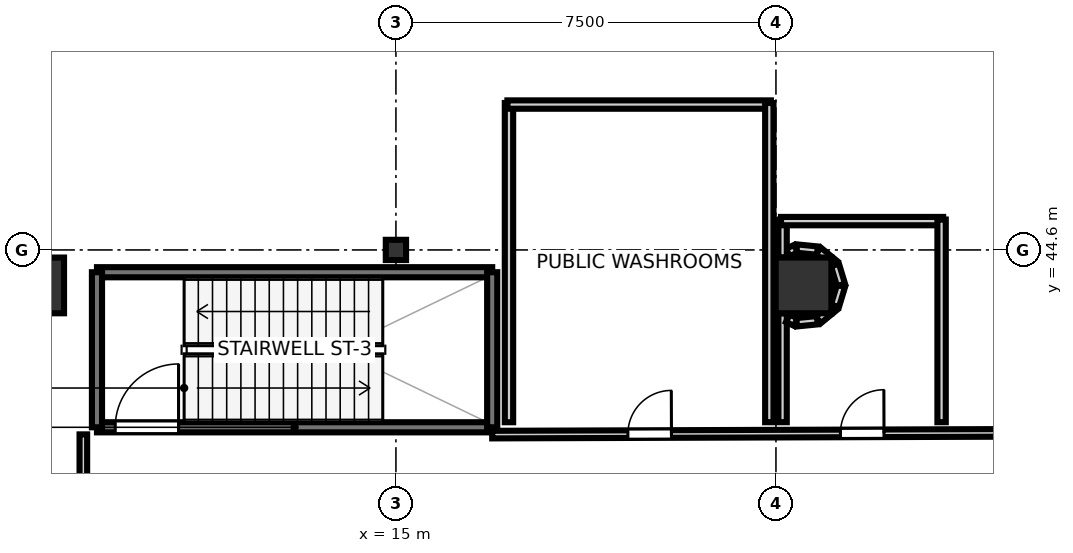
"""IFC4 building model, lengths in metres.
Left out: names, types, materials, properties, quantities, classifications, styles, units other than length and angle.
Written with IfcOpenShell. Run it as: python <this file> out.ifc"""

import sys

from ifc_helpers import new_model, si_unit, direction, frame, frame_2d, origin, origin_2d, place, context, subcontext, project, spatial, rectangle, i_section, extrude, element, fill, save


model = new_model("IFC4")
c1 = context("Model", 3, precision=1e-05, world=origin(), true_north=direction((0.0, 1.0)))
c2 = subcontext(c1, "Body", "Model", "MODEL_VIEW")
j1 = project(units=[si_unit("LENGTHUNIT", "METRE"), si_unit("PLANEANGLEUNIT", "RADIAN")], contexts=[c1])
p1 = place(None, origin())
s1 = spatial("IfcSite", under=j1, at=p1, CompositionType="ELEMENT")
p2 = place(p1, origin())
s2 = spatial("IfcBuilding", under=s1, at=p2, CompositionType="ELEMENT")
p3 = place(p2, frame((0.0, 0.0, 6.0)))
s3 = spatial("IfcBuildingStorey", under=s2, at=p3, CompositionType="ELEMENT", Elevation=6.0)
for number, where, z_axis, x_axis in (
    (1, (7.9, 43.9, 0.0), (0.0, 0.0, 1.0), (1.0, 0.0, 0.0)),
    (2, (23.045, 43.9, 0.0), (0.0, 0.0, 1.0), (1.0, 0.0, 0.0)),
):
    element("IfcColumn", number, at=place(p3, frame(where, z_axis=z_axis, x_axis=x_axis)), inside=s3, PredefinedType="COLUMN", context=c2, shape_type="SweptSolid", body=[
        extrude(rectangle(XDim=1.1, YDim=1.1, at=origin_2d()), origin(), (0.0, 0.0, 1.0), 5.0),
    ])
p4 = place(p3, frame((15.0, 44.6, 0.0), z_axis=(0.0, 0.0, 1.0), x_axis=(1.0, 0.0, 0.0)))
e3 = element("IfcColumn", 3, at=p4, inside=s3, PredefinedType="COLUMN", context=c2, shape_type="SweptSolid", body=[
    extrude(i_section(OverallWidth=0.4, OverallDepth=0.4, WebThickness=0.013, FlangeThickness=0.021, at=origin_2d()), origin(), (0.0, 0.0, 1.0), 5.0),
])
p5 = place(p3, frame((9.1, 41.1, 0.0), z_axis=(0.0, 0.0, 1.0), x_axis=(1.0, 0.0, 0.0)))
e4 = element("IfcWall", 4, at=p5, inside=s3, PredefinedType="SOLIDWALL", context=c2, shape_type="SweptSolid", body=[
    extrude(rectangle(XDim=7.8, YDim=0.2, at=frame_2d((3.9, 0.0))), origin(), (0.0, 0.0, 1.0), 4.78),
])
p6 = place(p5, frame((0.36, 0.0, 0.0)))
e5 = element("IfcOpeningElement", 5, at=p6, cuts=e4, PredefinedType="OPENING", context=c2, shape_type="SweptSolid", body=[
    extrude(rectangle(XDim=1.25, YDim=2.15, at=frame_2d((0.625, 1.075))), frame((0.0, 0.11, 0.0), z_axis=(0.0, -1.0, 0.0), x_axis=(1.0, 0.0, 0.0)), (0.0, 0.0, 1.0), 0.22),
])
p7 = place(p3, frame((9.1, 44.16, 0.0), z_axis=(0.0, 0.0, 1.0), x_axis=(1.0, 0.0, 0.0)))
e6 = element("IfcWall", 6, at=p7, inside=s3, PredefinedType="SOLIDWALL", context=c2, shape_type="SweptSolid", body=[
    extrude(rectangle(XDim=7.8, YDim=0.2, at=frame_2d((3.9, 0.0))), origin(), (0.0, 0.0, 1.0), 4.78),
])
for number, where, z_axis, x_axis in (
    (7, (9.1, 41.1, 0.0), (0.0, 0.0, 1.0), (0.0, 1.0, 0.0)),
    (8, (16.9, 41.1, 0.0), (0.0, 0.0, 1.0), (0.0, 1.0, 0.0)),
):
    element("IfcWall", number, at=place(p3, frame(where, z_axis=z_axis, x_axis=x_axis)), inside=s3, PredefinedType="SOLIDWALL", context=c2, shape_type="SweptSolid", body=[
        extrude(rectangle(XDim=3.06, YDim=0.2, at=frame_2d((1.53, 0.0))), origin(), (0.0, 0.0, 1.0), 4.78),
    ])
p8 = place(p3, frame((8.831, 37.8, 0.0), z_axis=(0.0, 0.0, 1.0), x_axis=(0.0, 1.0, 0.0)))
e9 = element("IfcWall", 9, at=p8, inside=s3, PredefinedType="PARTITIONING", context=c2, shape_type="SweptSolid", body=[
    extrude(rectangle(XDim=3.16, YDim=0.15, at=frame_2d((1.58, 0.0))), origin(), (0.0, 0.0, 1.0), 4.1),
])
p9 = place(p3, frame((16.9, 40.956, 0.0), z_axis=(0.0, 0.0, 1.0), x_axis=(0.999994432489, 0.003336913407, 0.0)))
e10 = element("IfcWall", 10, at=p9, inside=s3, PredefinedType="PARTITIONING", context=c2, shape_type="SweptSolid", body=[
    extrude(rectangle(XDim=9.95, YDim=0.15, at=frame_2d((4.975, 0.0))), origin(), (0.0, 0.0, 1.0), 4.1),
])
p10 = place(p9, frame((6.873, 0.0, 0.0)))
e11 = element("IfcOpeningElement", 11, at=p10, cuts=e10, PredefinedType="OPENING", context=c2, shape_type="SweptSolid", body=[
    extrude(rectangle(XDim=0.86, YDim=2.05, at=frame_2d((0.43, 1.025))), frame((0.0, 0.085, 0.0), z_axis=(0.0, -1.0, 0.0), x_axis=(1.0, 0.0, 0.0)), (0.0, 0.0, 1.0), 0.17),
])
p11 = place(p9, frame((2.678, 0.0, 0.0)))
e12 = element("IfcOpeningElement", 12, at=p11, cuts=e10, PredefinedType="OPENING", context=c2, shape_type="SweptSolid", body=[
    extrude(rectangle(XDim=0.86, YDim=2.05, at=frame_2d((0.43, 1.025))), frame((0.0, 0.085, 0.0), z_axis=(0.0, -1.0, 0.0), x_axis=(1.0, 0.0, 0.0)), (0.0, 0.0, 1.0), 0.17),
])
p12 = place(p3, frame((22.631, 41.2, 0.0), z_axis=(0.0, 0.0, 1.0), x_axis=(0.0, 1.0, 0.0)))
e13 = element("IfcWall", 13, at=p12, inside=s3, PredefinedType="PLUMBINGWALL", context=c2, shape_type="SweptSolid", body=[
    extrude(rectangle(XDim=2.151, YDim=0.165, at=frame_2d((1.075, 0.0))), origin(), (0.0, 0.0, 1.0), 4.1),
])
p13 = place(p3, frame((22.734, 43.252, 0.0), z_axis=(0.0, 0.0, 1.0), x_axis=(0.901001669759, -0.433815618773, 0.0)))
e14 = element("IfcWall", 14, at=p13, inside=s3, PredefinedType="PLUMBINGWALL", context=c2, shape_type="SweptSolid", body=[
    extrude(rectangle(XDim=0.176, YDim=0.165, at=frame_2d((0.088, 0.0))), origin(), (0.0, 0.0, 1.0), 4.1),
])
for number, where, z_axis, x_axis in (
    (15, (22.909, 43.173, 0.0), (0.0, 0.0, 1.0), (0.995, 0.098, 0.0)),
    (16, (23.336, 43.22, 0.0), (0.0, 0.0, 1.0), (0.773, 0.634, 0.0)),
):
    element("IfcWall", number, at=place(p3, frame(where, z_axis=z_axis, x_axis=x_axis)), inside=s3, PredefinedType="PLUMBINGWALL", context=c2, shape_type="SweptSolid", body=[
        extrude(rectangle(XDim=0.412, YDim=0.165, at=frame_2d((0.206, 0.0))), origin(), (0.0, 0.0, 1.0), 4.1),
    ])
for number, where, z_axis, x_axis in (
    (17, (23.665, 43.497, 0.0), (0.0, 0.0, 1.0), (0.29, 0.957, 0.0)),
    (18, (23.784, 43.909, 0.0), (0.0, 0.0, 1.0), (-0.29, 0.957, 0.0)),
):
    element("IfcWall", number, at=place(p3, frame(where, z_axis=z_axis, x_axis=x_axis)), inside=s3, PredefinedType="PLUMBINGWALL", context=c2, shape_type="SweptSolid", body=[
        extrude(rectangle(XDim=0.412, YDim=0.165, at=frame_2d((0.206, 0.0))), origin(), (0.0, 0.0, 1.0), 4.1),
    ])
for number, where, z_axis, x_axis in (
    (19, (23.655, 44.318, 0.0), (0.0, 0.0, 1.0), (-0.773, 0.634, 0.0)),
    (20, (23.319, 44.587, 0.0), (0.0, 0.0, 1.0), (-0.995, 0.098, 0.0)),
):
    element("IfcWall", number, at=place(p3, frame(where, z_axis=z_axis, x_axis=x_axis)), inside=s3, PredefinedType="PLUMBINGWALL", context=c2, shape_type="SweptSolid", body=[
        extrude(rectangle(XDim=0.412, YDim=0.165, at=frame_2d((0.206, 0.0))), origin(), (0.0, 0.0, 1.0), 4.1),
    ])
p14 = place(p3, frame((22.893, 44.624, 0.0), z_axis=(0.0, 0.0, 1.0), x_axis=(-0.901001669759, -0.433815618773, 0.0)))
e21 = element("IfcWall", 21, at=p14, inside=s3, PredefinedType="PLUMBINGWALL", context=c2, shape_type="SweptSolid", body=[
    extrude(rectangle(XDim=0.176, YDim=0.165, at=frame_2d((0.088, 0.0))), origin(), (0.0, 0.0, 1.0), 4.1),
])
p15 = place(p3, frame((22.631, 44.449, 0.0), z_axis=(0.0, 0.0, 1.0), x_axis=(0.0, 1.0, 0.0)))
e22 = element("IfcWall", 22, at=p15, inside=s3, PredefinedType="PLUMBINGWALL", context=c2, shape_type="SweptSolid", body=[
    extrude(rectangle(XDim=0.751, YDim=0.165, at=frame_2d((0.375, 0.0))), origin(), (0.0, 0.0, 1.0), 4.1),
])
p16 = place(p3, frame((22.6, 45.169, 0.0), z_axis=(0.0, 0.0, 1.0), x_axis=(1.0, 0.0, 0.0)))
e23 = element("IfcWall", 23, at=p16, inside=s3, PredefinedType="PLUMBINGWALL", context=c2, shape_type="SweptSolid", body=[
    extrude(rectangle(XDim=3.2, YDim=0.165, at=frame_2d((1.6, 0.0))), origin(), (0.0, 0.0, 1.0), 4.1),
])
p17 = place(p3, frame((25.769, 45.2, 0.0), z_axis=(0.0, 0.0, 1.0), x_axis=(0.0, -1.0, 0.0)))
e24 = element("IfcWall", 24, at=p17, inside=s3, PredefinedType="PLUMBINGWALL", context=c2, shape_type="SweptSolid", body=[
    extrude(rectangle(XDim=4.0, YDim=0.165, at=frame_2d((2.0, 0.0))), origin(), (0.0, 0.0, 1.0), 4.1),
])
p18 = place(p3, frame((17.231, 41.2, 0.0), z_axis=(0.0, 0.0, 1.0), x_axis=(0.0, 1.0, 0.0)))
e25 = element("IfcWall", 25, at=p18, inside=s3, PredefinedType="PLUMBINGWALL", context=c2, shape_type="SweptSolid", body=[
    extrude(rectangle(XDim=6.3, YDim=0.165, at=frame_2d((3.15, 0.0))), origin(), (0.0, 0.0, 1.0), 4.1),
])
p19 = place(p3, frame((17.2, 47.469, 0.0), z_axis=(0.0, 0.0, 1.0), x_axis=(1.0, 0.0, 0.0)))
e26 = element("IfcWall", 26, at=p19, inside=s3, PredefinedType="PLUMBINGWALL", context=c2, shape_type="SweptSolid", body=[
    extrude(rectangle(XDim=5.2, YDim=0.165, at=frame_2d((2.6, 0.0))), origin(), (0.0, 0.0, 1.0), 4.1),
])
p20 = place(p3, frame((22.369, 47.5, 0.0), z_axis=(0.0, 0.0, 1.0), x_axis=(0.0, -1.0, 0.0)))
e27 = element("IfcWall", 27, at=p20, inside=s3, PredefinedType="PLUMBINGWALL", context=c2, shape_type="SweptSolid", body=[
    extrude(rectangle(XDim=6.3, YDim=0.165, at=frame_2d((3.15, 0.0))), origin(), (0.0, 0.0, 1.0), 4.1),
])
p21 = place(p6, origin())
e28 = element("IfcDoor", 28, at=p21, inside=s3, OperationType="SINGLE_SWING_RIGHT", PredefinedType="DOOR", context=c2, shape_type="SweptSolid", body=[
    extrude(rectangle(XDim=1.25, YDim=2.15, at=frame_2d((0.625, 1.075))), frame((0.0, 0.025, 0.0), z_axis=(0.0, -1.0, 0.0), x_axis=(1.0, 0.0, 0.0)), (0.0, 0.0, 1.0), 0.05),
])
fill(e5, e28)
p22 = place(p10, origin())
e29 = element("IfcDoor", 29, at=p22, inside=s3, OperationType="SINGLE_SWING_RIGHT", PredefinedType="DOOR", context=c2, shape_type="SweptSolid", body=[
    extrude(rectangle(XDim=0.86, YDim=2.05, at=frame_2d((0.43, 1.025))), frame((0.0, 0.025, 0.0), z_axis=(0.0, -1.0, 0.0), x_axis=(1.0, 0.0, 0.0)), (0.0, 0.0, 1.0), 0.05),
])
fill(e11, e29)
p23 = place(p11, origin())
e30 = element("IfcDoor", 30, at=p23, inside=s3, OperationType="SINGLE_SWING_RIGHT", PredefinedType="DOOR", context=c2, shape_type="SweptSolid", body=[
    extrude(rectangle(XDim=0.86, YDim=2.05, at=frame_2d((0.43, 1.025))), frame((0.0, 0.025, 0.0), z_axis=(0.0, -1.0, 0.0), x_axis=(1.0, 0.0, 0.0)), (0.0, 0.0, 1.0), 0.05),
])
fill(e12, e30)
save(model, sys.argv[1])
